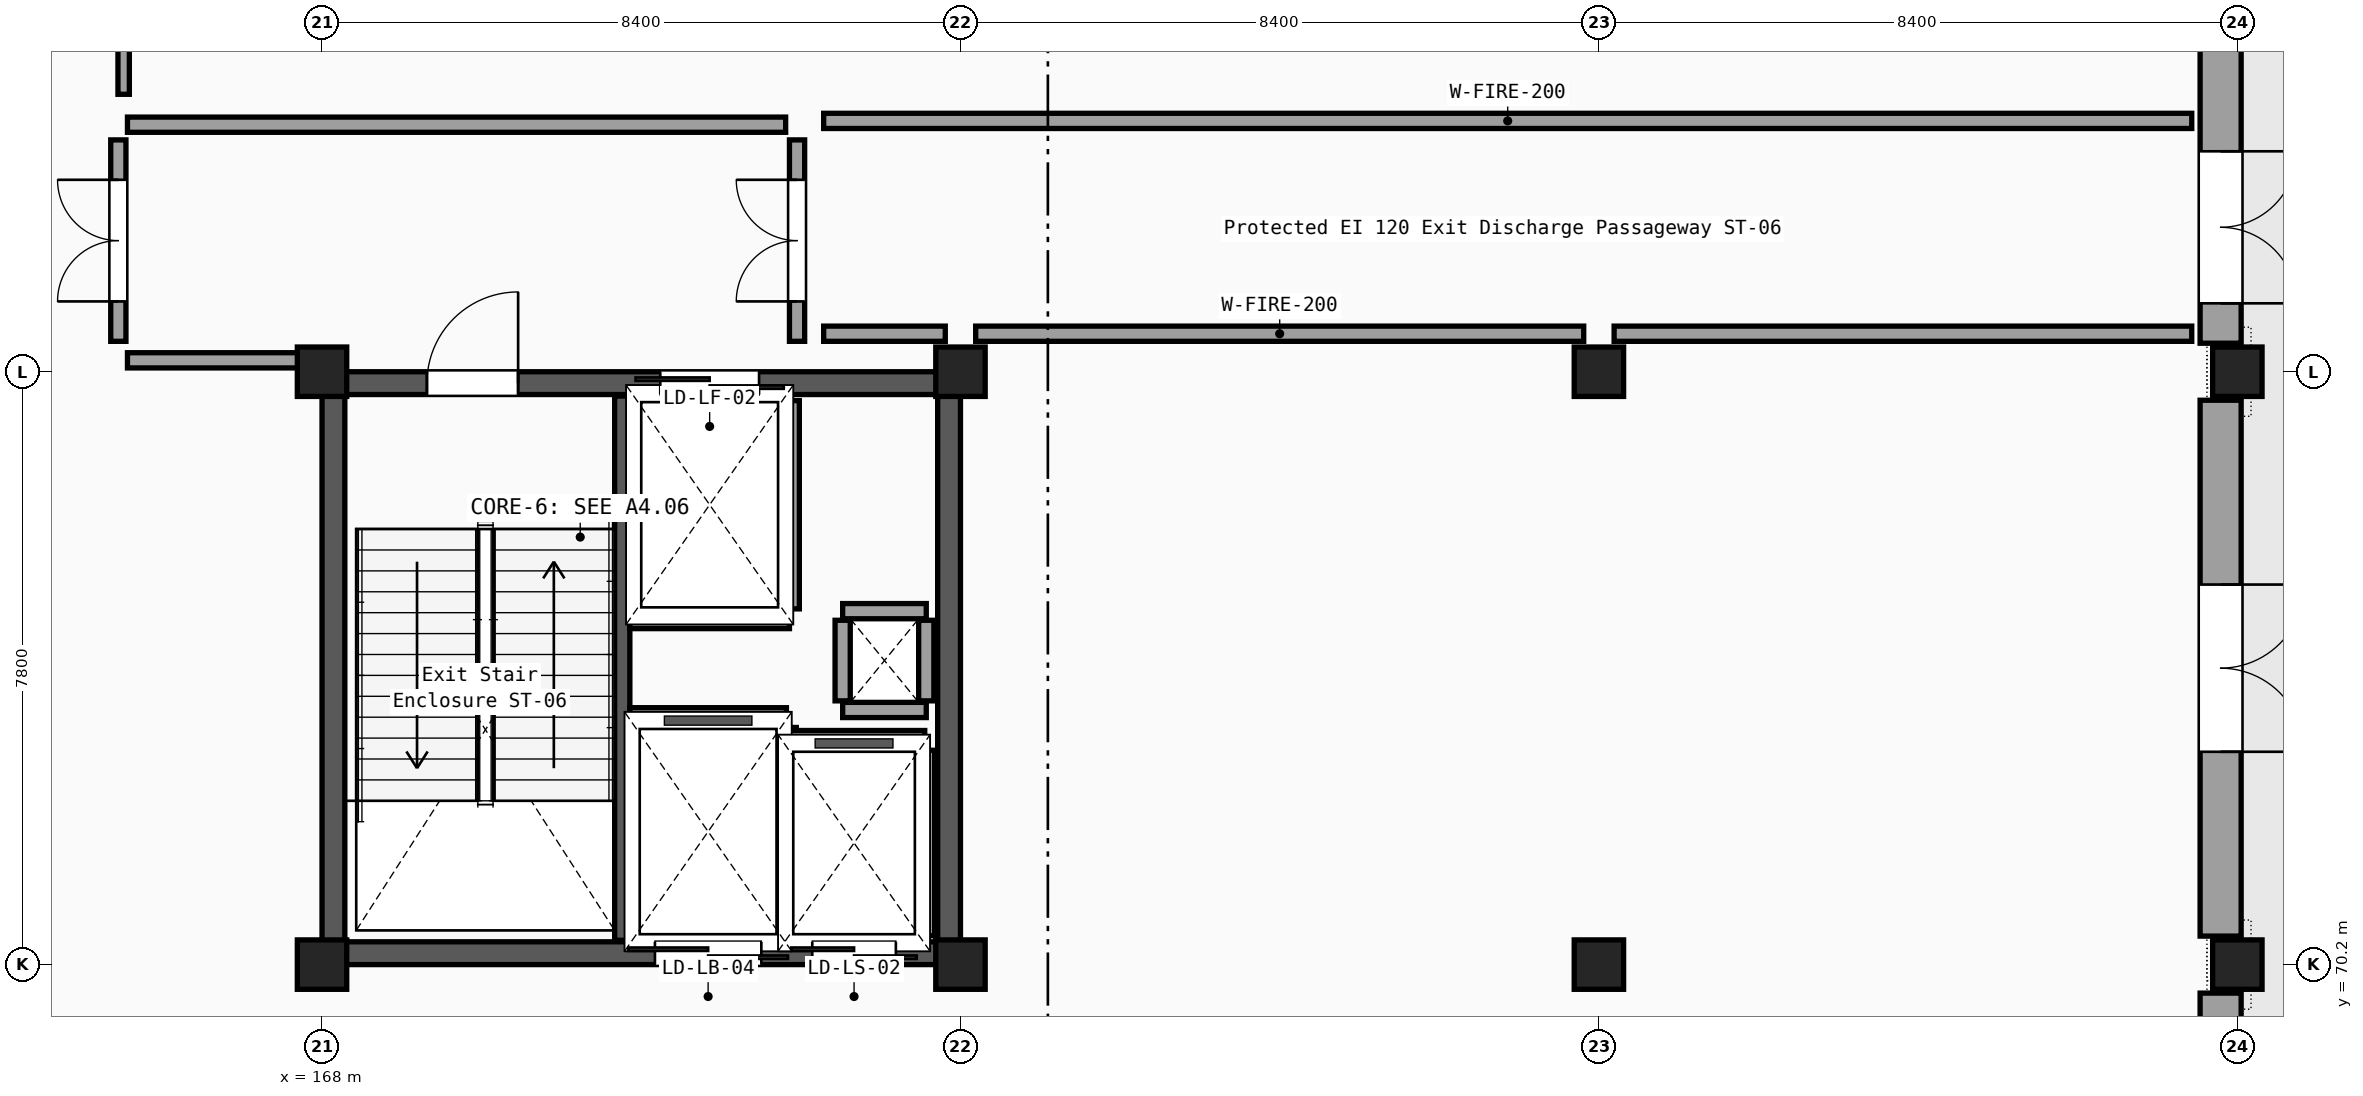
"""IFC4 building model, lengths in metres.
Left out: names, types, materials, properties, quantities, classifications, styles, units other than length and angle.
Written with IfcOpenShell. Run it as: python <this file> out.ifc"""

import sys

from ifc_helpers import new_model, si_unit, direction, frame, frame_2d, origin, origin_2d, place, context, subcontext, project, spatial, rectangle, i_section, extrude, element, fill, save


model = new_model("IFC4")
c1 = context("Model", 3, precision=1e-05, world=origin(), true_north=direction((0.0, 1.0)))
c2 = subcontext(c1, "Body", "Model", "MODEL_VIEW")
j1 = project(units=[si_unit("LENGTHUNIT", "METRE"), si_unit("PLANEANGLEUNIT", "RADIAN")], contexts=[c1])
p1 = place(None, origin())
s1 = spatial("IfcSite", under=j1, at=p1, CompositionType="ELEMENT")
p2 = place(p1, origin())
s2 = spatial("IfcBuilding", under=s1, at=p2, CompositionType="ELEMENT")
p3 = place(p2, origin())
s3 = spatial("IfcBuildingStorey", under=s2, at=p3, CompositionType="ELEMENT", Elevation=0.0)
for number, where, z_axis, x_axis in (
    (1, (168.0, 70.2, 0.0), (0.0, 0.0, 1.0), (1.0, 0.0, 0.0)),
    (2, (168.0, 78.0, 0.0), (0.0, 0.0, 1.0), (1.0, 0.0, 0.0)),
    (3, (176.4, 70.2, 0.0), (0.0, 0.0, 1.0), (1.0, 0.0, 0.0)),
    (4, (176.4, 78.0, 0.0), (0.0, 0.0, 1.0), (1.0, 0.0, 0.0)),
    (5, (184.8, 70.2, 0.0), (0.0, 0.0, 1.0), (1.0, 0.0, 0.0)),
    (6, (184.8, 78.0, 0.0), (0.0, 0.0, 1.0), (1.0, 0.0, 0.0)),
    (7, (193.2, 70.2, 0.0), (0.0, 0.0, 1.0), (1.0, 0.0, 0.0)),
    (8, (193.2, 78.0, 0.0), (0.0, 0.0, 1.0), (1.0, 0.0, 0.0)),
):
    element("IfcColumn", number, at=place(p3, frame(where, z_axis=z_axis, x_axis=x_axis)), inside=s3, PredefinedType="COLUMN", context=c2, shape_type="SweptSolid", body=[
        extrude(i_section(OverallWidth=0.3, OverallDepth=0.65, WebThickness=0.016, FlangeThickness=0.031, FilletRadius=0.027, at=origin_2d()), origin(), (0.0, 0.0, 1.0), 5.1),
    ])
p4 = place(p3, frame((192.98, 62.775, 0.0), z_axis=(0.0, 0.0, 1.0), x_axis=(0.0, 1.0, 0.0)))
e9 = element("IfcWall", 9, at=p4, inside=s3, PredefinedType="SOLIDWALL", context=c2, shape_type="SweptSolid", body=[
    extrude(rectangle(XDim=7.05, YDim=0.54, at=frame_2d((3.525, 0.0))), origin(), (0.0, 0.0, 1.0), 4.33),
])
p5 = place(p4, frame((1.925, 0.0, 0.75)))
e10 = element("IfcOpeningElement", 10, at=p5, cuts=e9, PredefinedType="OPENING", context=c2, shape_type="SweptSolid", body=[
    extrude(rectangle(XDim=3.2, YDim=1.8, at=frame_2d((1.6, 0.9))), frame((0.0, 0.28, 0.0), z_axis=(0.0, -1.0, 0.0), x_axis=(1.0, 0.0, 0.0)), (0.0, 0.0, 1.0), 0.56),
])
p6 = place(p3, frame((192.98, 70.575, 0.0), z_axis=(0.0, 0.0, 1.0), x_axis=(0.0, 1.0, 0.0)))
e11 = element("IfcWall", 11, at=p6, inside=s3, PredefinedType="SOLIDWALL", context=c2, shape_type="SweptSolid", body=[
    extrude(rectangle(XDim=7.05, YDim=0.54, at=frame_2d((3.525, 0.0))), origin(), (0.0, 0.0, 1.0), 4.33),
])
p7 = place(p6, frame((2.425, 0.0, 0.0)))
e12 = element("IfcOpeningElement", 12, at=p7, cuts=e11, PredefinedType="OPENING", context=c2, shape_type="SweptSolid", body=[
    extrude(rectangle(XDim=2.2, YDim=2.3, at=frame_2d((1.1, 1.15))), frame((0.0, 0.28, 0.0), z_axis=(0.0, -1.0, 0.0), x_axis=(1.0, 0.0, 0.0)), (0.0, 0.0, 1.0), 0.56),
])
p8 = place(p3, frame((192.98, 78.375, 0.0), z_axis=(0.0, 0.0, 1.0), x_axis=(0.0, 1.0, 0.0)))
e13 = element("IfcWall", 13, at=p8, inside=s3, PredefinedType="SOLIDWALL", context=c2, shape_type="SweptSolid", body=[
    extrude(rectangle(XDim=7.05, YDim=0.54, at=frame_2d((3.525, 0.0))), origin(), (0.0, 0.0, 1.0), 4.33),
])
p9 = place(p8, frame((0.525, 0.0, 0.0)))
e14 = element("IfcOpeningElement", 14, at=p9, cuts=e13, PredefinedType="OPENING", context=c2, shape_type="SweptSolid", body=[
    extrude(rectangle(XDim=2.0, YDim=2.25, at=frame_2d((1.0, 1.125))), frame((0.0, 0.28, 0.0), z_axis=(0.0, -1.0, 0.0), x_axis=(1.0, 0.0, 0.0)), (0.0, 0.0, 1.0), 0.56),
])
p10 = place(p3, frame((168.0, 70.35, 0.0), z_axis=(0.0, 0.0, 1.0), x_axis=(1.0, 0.0, 0.0)))
e15 = element("IfcWall", 15, at=p10, inside=s3, PredefinedType="SHEAR", context=c2, shape_type="SweptSolid", body=[
    extrude(rectangle(XDim=8.4, YDim=0.3, at=frame_2d((4.2, 0.0))), origin(), (0.0, 0.0, 1.0), 4.85),
])
p11 = place(p10, frame((4.38, 0.0, 0.0)))
e16 = element("IfcOpeningElement", 16, at=p11, cuts=e15, PredefinedType="OPENING", context=c2, shape_type="SweptSolid", body=[
    extrude(rectangle(XDim=1.4, YDim=2.2, at=frame_2d((0.7, 1.1))), frame((0.0, 0.16, 0.0), z_axis=(0.0, -1.0, 0.0), x_axis=(1.0, 0.0, 0.0)), (0.0, 0.0, 1.0), 0.32),
])
p12 = place(p10, frame((6.45, 0.0, 0.0)))
e17 = element("IfcOpeningElement", 17, at=p12, cuts=e15, PredefinedType="OPENING", context=c2, shape_type="SweptSolid", body=[
    extrude(rectangle(XDim=1.1, YDim=2.15, at=frame_2d((0.55, 1.075))), frame((0.0, 0.16, 0.0), z_axis=(0.0, -1.0, 0.0), x_axis=(1.0, 0.0, 0.0)), (0.0, 0.0, 1.0), 0.32),
])
p13 = place(p3, frame((168.0, 77.85, 0.0), z_axis=(0.0, 0.0, 1.0), x_axis=(1.0, 0.0, 0.0)))
e18 = element("IfcWall", 18, at=p13, inside=s3, PredefinedType="SHEAR", context=c2, shape_type="SweptSolid", body=[
    extrude(rectangle(XDim=8.4, YDim=0.3, at=frame_2d((4.2, 0.0))), origin(), (0.0, 0.0, 1.0), 4.85),
])
p14 = place(p13, frame((1.38, 0.0, 0.0)))
e19 = element("IfcOpeningElement", 19, at=p14, cuts=e18, PredefinedType="OPENING", context=c2, shape_type="SweptSolid", body=[
    extrude(rectangle(XDim=1.2, YDim=2.15, at=frame_2d((0.6, 1.075))), frame((0.0, 0.16, 0.0), z_axis=(0.0, -1.0, 0.0), x_axis=(1.0, 0.0, 0.0)), (0.0, 0.0, 1.0), 0.32),
])
p15 = place(p13, frame((4.45, 0.0, 0.0)))
e20 = element("IfcOpeningElement", 20, at=p15, cuts=e18, PredefinedType="OPENING", context=c2, shape_type="SweptSolid", body=[
    extrude(rectangle(XDim=1.3, YDim=2.2, at=frame_2d((0.65, 1.1))), frame((0.0, 0.16, 0.0), z_axis=(0.0, -1.0, 0.0), x_axis=(1.0, 0.0, 0.0)), (0.0, 0.0, 1.0), 0.32),
])
for number, where, z_axis, x_axis in (
    (21, (168.15, 70.5, 0.0), (0.0, 0.0, 1.0), (0.0, 1.0, 0.0)),
    (22, (176.25, 70.5, 0.0), (0.0, 0.0, 1.0), (0.0, 1.0, 0.0)),
):
    element("IfcWall", number, at=place(p3, frame(where, z_axis=z_axis, x_axis=x_axis)), inside=s3, PredefinedType="SHEAR", context=c2, shape_type="SweptSolid", body=[
        extrude(rectangle(XDim=7.2, YDim=0.3, at=frame_2d((3.6, 0.0))), origin(), (0.0, 0.0, 1.0), 4.85),
    ])
p16 = place(p3, frame((171.95, 70.52, 0.0), z_axis=(0.0, 0.0, 1.0), x_axis=(0.0, 1.0, 0.0)))
e23 = element("IfcWall", 23, at=p16, inside=s3, PredefinedType="SHEAR", context=c2, shape_type="SweptSolid", body=[
    extrude(rectangle(XDim=7.16, YDim=0.2, at=frame_2d((3.58, 0.0))), origin(), (0.0, 0.0, 1.0), 4.85),
])
for number, where, z_axis, x_axis in (
    (24, (174.85, 73.55, 0.0), (0.0, 0.0, 1.0), (1.0, 0.0, 0.0)),
    (25, (174.85, 74.85, 0.0), (0.0, 0.0, 1.0), (1.0, 0.0, 0.0)),
):
    element("IfcWall", number, at=place(p3, frame(where, z_axis=z_axis, x_axis=x_axis)), inside=s3, PredefinedType="PARTITIONING", context=c2, shape_type="SweptSolid", body=[
        extrude(rectangle(XDim=1.1, YDim=0.2, at=frame_2d((0.55, 0.0))), origin(), (0.0, 0.0, 1.0), 4.33),
    ])
for number, where, z_axis, x_axis in (
    (26, (174.85, 73.67, 0.0), (0.0, 0.0, 1.0), (0.0, 1.0, 0.0)),
    (27, (175.95, 73.67, 0.0), (0.0, 0.0, 1.0), (0.0, 1.0, 0.0)),
):
    element("IfcWall", number, at=place(p3, frame(where, z_axis=z_axis, x_axis=x_axis)), inside=s3, PredefinedType="PARTITIONING", context=c2, shape_type="SweptSolid", body=[
        extrude(rectangle(XDim=1.06, YDim=0.2, at=frame_2d((0.53, 0.0))), origin(), (0.0, 0.0, 1.0), 4.33),
    ])
p17 = place(p3, frame((174.18, 74.88, 0.0), z_axis=(0.0, 0.0, 1.0), x_axis=(0.0, 1.0, 0.0)))
e28 = element("IfcWall", 28, at=p17, inside=s3, PredefinedType="PARTITIONING", context=c2, shape_type="SweptSolid", body=[
    extrude(rectangle(XDim=2.74, YDim=0.2, at=frame_2d((1.37, 0.0))), origin(), (0.0, 0.0, 1.0), 4.33),
])
p18 = place(p3, frame((172.05, 74.72, 0.0), z_axis=(0.0, 0.0, 1.0), x_axis=(1.0, 0.0, 0.0)))
e29 = element("IfcWall", 29, at=p18, inside=s3, PredefinedType="PARTITIONING", context=c2, shape_type="SweptSolid", body=[
    extrude(rectangle(XDim=2.1, YDim=0.2, at=frame_2d((1.05, 0.0))), origin(), (0.0, 0.0, 1.0), 4.33),
])
p19 = place(p3, frame((174.14, 70.58, 0.0), z_axis=(0.0, 0.0, 1.0), x_axis=(0.0, 1.0, 0.0)))
e30 = element("IfcWall", 30, at=p19, inside=s3, PredefinedType="PARTITIONING", context=c2, shape_type="SweptSolid", body=[
    extrude(rectangle(XDim=2.74, YDim=0.2, at=frame_2d((1.37, 0.0))), origin(), (0.0, 0.0, 1.0), 4.33),
])
p20 = place(p3, frame((172.05, 73.48, 0.0), z_axis=(0.0, 0.0, 1.0), x_axis=(1.0, 0.0, 0.0)))
e31 = element("IfcWall", 31, at=p20, inside=s3, PredefinedType="PARTITIONING", context=c2, shape_type="SweptSolid", body=[
    extrude(rectangle(XDim=2.06, YDim=0.2, at=frame_2d((1.03, 0.0))), origin(), (0.0, 0.0, 1.0), 4.33),
])
p21 = place(p3, frame((175.96, 70.58, 0.0), z_axis=(0.0, 0.0, 1.0), x_axis=(0.0, 1.0, 0.0)))
e32 = element("IfcWall", 32, at=p21, inside=s3, PredefinedType="PARTITIONING", context=c2, shape_type="SweptSolid", body=[
    extrude(rectangle(XDim=2.44, YDim=0.2, at=frame_2d((1.22, 0.0))), origin(), (0.0, 0.0, 1.0), 4.33),
])
p22 = place(p3, frame((174.07, 73.18, 0.0), z_axis=(0.0, 0.0, 1.0), x_axis=(1.0, 0.0, 0.0)))
e33 = element("IfcWall", 33, at=p22, inside=s3, PredefinedType="PARTITIONING", context=c2, shape_type="SweptSolid", body=[
    extrude(rectangle(XDim=1.86, YDim=0.2, at=frame_2d((0.93, 0.0))), origin(), (0.0, 0.0, 1.0), 4.33),
])
p23 = place(p3, frame((165.44, 78.15, 0.0), z_axis=(0.0, 0.0, 1.0), x_axis=(1.0, 0.0, 0.0)))
e34 = element("IfcWall", 34, at=p23, inside=s3, PredefinedType="PARTITIONING", context=c2, shape_type="SweptSolid", body=[
    extrude(rectangle(XDim=2.44, YDim=0.2, at=frame_2d((1.22, 0.0))), origin(), (0.0, 0.0, 1.0), 4.33),
])
p24 = place(p3, frame((165.44, 81.25, 0.0), z_axis=(0.0, 0.0, 1.0), x_axis=(1.0, 0.0, 0.0)))
e35 = element("IfcWall", 35, at=p24, inside=s3, PredefinedType="PARTITIONING", context=c2, shape_type="SweptSolid", body=[
    extrude(rectangle(XDim=8.66, YDim=0.2, at=frame_2d((4.33, 0.0))), origin(), (0.0, 0.0, 1.0), 4.33),
])
p25 = place(p3, frame((165.32, 78.4, 0.0), z_axis=(0.0, 0.0, 1.0), x_axis=(0.0, 1.0, 0.0)))
e36 = element("IfcWall", 36, at=p25, inside=s3, PredefinedType="PARTITIONING", context=c2, shape_type="SweptSolid", body=[
    extrude(rectangle(XDim=2.65, YDim=0.2, at=frame_2d((1.325, 0.0))), origin(), (0.0, 0.0, 1.0), 4.33),
])
p26 = place(p25, frame((0.525, 0.0, 0.0)))
e37 = element("IfcOpeningElement", 37, at=p26, cuts=e36, PredefinedType="OPENING", context=c2, shape_type="SweptSolid", body=[
    extrude(rectangle(XDim=1.6, YDim=2.2, at=frame_2d((0.8, 1.1))), frame((0.0, 0.11, 0.0), z_axis=(0.0, -1.0, 0.0), x_axis=(1.0, 0.0, 0.0)), (0.0, 0.0, 1.0), 0.22),
])
p27 = place(p3, frame((174.25, 78.4, 0.0), z_axis=(0.0, 0.0, 1.0), x_axis=(0.0, 1.0, 0.0)))
e38 = element("IfcWall", 38, at=p27, inside=s3, PredefinedType="PARTITIONING", context=c2, shape_type="SweptSolid", body=[
    extrude(rectangle(XDim=2.65, YDim=0.2, at=frame_2d((1.325, 0.0))), origin(), (0.0, 0.0, 1.0), 4.33),
])
p28 = place(p27, frame((0.525, 0.0, 0.0)))
e39 = element("IfcOpeningElement", 39, at=p28, cuts=e38, PredefinedType="OPENING", context=c2, shape_type="SweptSolid", body=[
    extrude(rectangle(XDim=1.6, YDim=2.2, at=frame_2d((0.8, 1.1))), frame((0.0, 0.11, 0.0), z_axis=(0.0, -1.0, 0.0), x_axis=(1.0, 0.0, 0.0)), (0.0, 0.0, 1.0), 0.22),
])
p29 = place(p3, frame((174.6, 78.5, 0.0), z_axis=(0.0, 0.0, 1.0), x_axis=(1.0, 0.0, 0.0)))
e40 = element("IfcWall", 40, at=p29, inside=s3, PredefinedType="PARTITIONING", context=c2, shape_type="SweptSolid", body=[
    extrude(rectangle(XDim=1.6, YDim=0.2, at=frame_2d((0.8, 0.0))), origin(), (0.0, 0.0, 1.0), 4.38),
])
p30 = place(p3, frame((176.6, 78.5, 0.0), z_axis=(0.0, 0.0, 1.0), x_axis=(1.0, 0.0, 0.0)))
e41 = element("IfcWall", 41, at=p30, inside=s3, PredefinedType="PARTITIONING", context=c2, shape_type="SweptSolid", body=[
    extrude(rectangle(XDim=8.0, YDim=0.2, at=frame_2d((4.0, 0.0))), origin(), (0.0, 0.0, 1.0), 4.38),
])
p31 = place(p3, frame((185.0, 78.5, 0.0), z_axis=(0.0, 0.0, 1.0), x_axis=(1.0, 0.0, 0.0)))
e42 = element("IfcWall", 42, at=p31, inside=s3, PredefinedType="PARTITIONING", context=c2, shape_type="SweptSolid", body=[
    extrude(rectangle(XDim=7.6, YDim=0.2, at=frame_2d((3.8, 0.0))), origin(), (0.0, 0.0, 1.0), 4.38),
])
p32 = place(p3, frame((174.6, 81.3, 0.0), z_axis=(0.0, 0.0, 1.0), x_axis=(1.0, 0.0, 0.0)))
e43 = element("IfcWall", 43, at=p32, inside=s3, PredefinedType="PARTITIONING", context=c2, shape_type="SweptSolid", body=[
    extrude(rectangle(XDim=18.0, YDim=0.2, at=frame_2d((9.0, 0.0))), origin(), (0.0, 0.0, 1.0), 4.38),
])
p33 = place(p3, frame((165.39, 81.65, 0.0), z_axis=(0.0, 0.0, 1.0), x_axis=(0.0, 1.0, 0.0)))
e44 = element("IfcWall", 44, at=p33, inside=s3, PredefinedType="PARTITIONING", context=c2, shape_type="SweptSolid", body=[
    extrude(rectangle(XDim=13.99, YDim=0.15, at=frame_2d((6.995, 0.0))), origin(), (0.0, 0.0, 1.0), 4.33),
])
p34 = place(p33, frame((6.47, 0.0, 0.0)))
e45 = element("IfcOpeningElement", 45, at=p34, cuts=e44, PredefinedType="OPENING", context=c2, shape_type="SweptSolid", body=[
    extrude(rectangle(XDim=1.05, YDim=2.15, at=frame_2d((0.525, 1.075))), frame((0.0, 0.085, 0.0), z_axis=(0.0, -1.0, 0.0), x_axis=(1.0, 0.0, 0.0)), (0.0, 0.0, 1.0), 0.17),
])
p35 = place(p7, frame((2.2, 0.0, 0.0), z_axis=(0.0, 0.0, 1.0), x_axis=(-1.0, 0.0, 0.0)))
e46 = element("IfcDoor", 46, at=p35, inside=s3, OperationType="DOUBLE_DOOR_SINGLE_SWING", PredefinedType="DOOR", context=c2, shape_type="SweptSolid", body=[
    extrude(rectangle(XDim=2.2, YDim=2.3, at=frame_2d((1.1, 1.15))), frame((0.0, 0.025, 0.0), z_axis=(0.0, -1.0, 0.0), x_axis=(1.0, 0.0, 0.0)), (0.0, 0.0, 1.0), 0.05),
])
fill(e12, e46)
p36 = place(p9, frame((2.0, 0.0, 0.0), z_axis=(0.0, 0.0, 1.0), x_axis=(-1.0, 0.0, 0.0)))
e47 = element("IfcDoor", 47, at=p36, inside=s3, OperationType="DOUBLE_DOOR_SINGLE_SWING", PredefinedType="DOOR", context=c2, shape_type="SweptSolid", body=[
    extrude(rectangle(XDim=2.0, YDim=2.25, at=frame_2d((1.0, 1.125))), frame((0.0, 0.025, 0.0), z_axis=(0.0, -1.0, 0.0), x_axis=(1.0, 0.0, 0.0)), (0.0, 0.0, 1.0), 0.05),
])
fill(e14, e47)
p37 = place(p14, origin())
e48 = element("IfcDoor", 48, at=p37, inside=s3, OperationType="SINGLE_SWING_RIGHT", PredefinedType="DOOR", context=c2, shape_type="SweptSolid", body=[
    extrude(rectangle(XDim=1.2, YDim=2.15, at=frame_2d((0.6, 1.075))), frame((0.0, 0.025, 0.0), z_axis=(0.0, -1.0, 0.0), x_axis=(1.0, 0.0, 0.0)), (0.0, 0.0, 1.0), 0.05),
])
fill(e19, e48)
p38 = place(p15, origin())
e49 = element("IfcDoor", 49, at=p38, inside=s3, OperationType="DOUBLE_DOOR_SLIDING", PredefinedType="DOOR", context=c2, shape_type="SweptSolid", body=[
    extrude(rectangle(XDim=1.3, YDim=2.2, at=frame_2d((0.65, 1.1))), frame((0.0, 0.025, 0.0), z_axis=(0.0, -1.0, 0.0), x_axis=(1.0, 0.0, 0.0)), (0.0, 0.0, 1.0), 0.05),
])
fill(e20, e49)
p39 = place(p11, origin())
e50 = element("IfcDoor", 50, at=p39, inside=s3, OperationType="DOUBLE_DOOR_SLIDING", PredefinedType="DOOR", context=c2, shape_type="SweptSolid", body=[
    extrude(rectangle(XDim=1.4, YDim=2.2, at=frame_2d((0.7, 1.1))), frame((0.0, 0.025, 0.0), z_axis=(0.0, -1.0, 0.0), x_axis=(1.0, 0.0, 0.0)), (0.0, 0.0, 1.0), 0.05),
])
fill(e16, e50)
p40 = place(p12, origin())
e51 = element("IfcDoor", 51, at=p40, inside=s3, OperationType="DOUBLE_DOOR_SLIDING", PredefinedType="DOOR", context=c2, shape_type="SweptSolid", body=[
    extrude(rectangle(XDim=1.1, YDim=2.15, at=frame_2d((0.55, 1.075))), frame((0.0, 0.025, 0.0), z_axis=(0.0, -1.0, 0.0), x_axis=(1.0, 0.0, 0.0)), (0.0, 0.0, 1.0), 0.05),
])
fill(e17, e51)
p41 = place(p26, origin())
e52 = element("IfcDoor", 52, at=p41, inside=s3, OperationType="DOUBLE_DOOR_SINGLE_SWING", PredefinedType="DOOR", context=c2, shape_type="SweptSolid", body=[
    extrude(rectangle(XDim=1.6, YDim=2.2, at=frame_2d((0.8, 1.1))), frame((0.0, 0.025, 0.0), z_axis=(0.0, -1.0, 0.0), x_axis=(1.0, 0.0, 0.0)), (0.0, 0.0, 1.0), 0.05),
])
fill(e37, e52)
p42 = place(p28, origin())
e53 = element("IfcDoor", 53, at=p42, inside=s3, OperationType="DOUBLE_DOOR_SINGLE_SWING", PredefinedType="DOOR", context=c2, shape_type="SweptSolid", body=[
    extrude(rectangle(XDim=1.6, YDim=2.2, at=frame_2d((0.8, 1.1))), frame((0.0, 0.025, 0.0), z_axis=(0.0, -1.0, 0.0), x_axis=(1.0, 0.0, 0.0)), (0.0, 0.0, 1.0), 0.05),
])
fill(e39, e53)
save(model, sys.argv[1])
